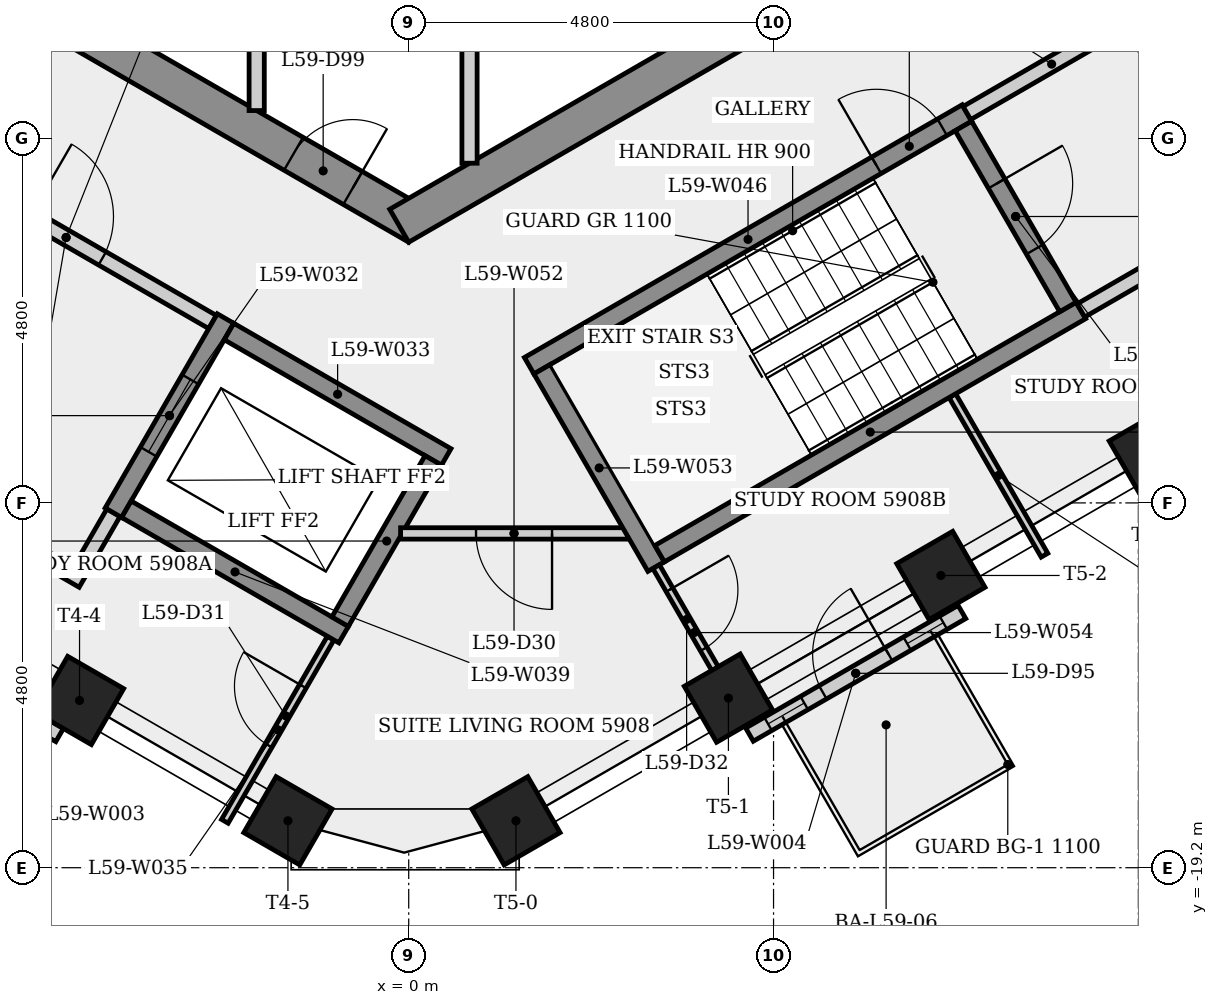
"""IFC4 building model, lengths in metres.
Left out: names, types, materials, properties, quantities, classifications, styles, units other than length and angle.
Written with IfcOpenShell. Run it as: python <this file> out.ifc"""

import sys

from ifc_helpers import new_model, si_unit, direction, frame, frame_2d, origin, origin_2d, place, context, subcontext, project, spatial, rectangle, extrude, element, fill, save


model = new_model("IFC4")
c1 = context("Model", 3, precision=1e-05, world=origin(), true_north=direction((0.0, 1.0)))
c2 = subcontext(c1, "Body", "Model", "MODEL_VIEW")
j1 = project(units=[si_unit("LENGTHUNIT", "METRE"), si_unit("PLANEANGLEUNIT", "RADIAN")], contexts=[c1])
p1 = place(None, origin())
s1 = spatial("IfcSite", under=j1, at=p1, CompositionType="ELEMENT")
p2 = place(p1, origin())
s2 = spatial("IfcBuilding", under=s1, at=p2, CompositionType="ELEMENT")
p3 = place(p2, frame((0.0, 0.0, 222.3)))
s3 = spatial("IfcBuildingStorey", under=s2, at=p3, CompositionType="ELEMENT", Elevation=222.3)
p4 = place(p3, frame((-9.375, -5.268, 0.0), z_axis=(0.0, 0.0, 1.0), x_axis=(0.866023993627, -0.500002442456, 0.0)))
e1 = element("IfcWall", 1, at=p4, inside=s3, PredefinedType="SHEAR", context=c2, shape_type="SweptSolid", body=[
    extrude(rectangle(XDim=10.97, YDim=0.5, at=frame_2d((5.485, 0.0))), origin(), (0.0, 0.0, 1.0), 3.4),
])
p5 = place(p4, frame((3.857, 0.0, 0.0)))
e2 = element("IfcOpeningElement", 2, at=p5, cuts=e1, PredefinedType="OPENING", context=c2, shape_type="SweptSolid", body=[
    extrude(rectangle(XDim=0.9, YDim=2.1, at=frame_2d((0.45, 1.05))), frame((0.0, 0.26, 0.0), z_axis=(0.0, -1.0, 0.0), x_axis=(1.0, 0.0, 0.0)), (0.0, 0.0, 1.0), 0.52),
])
p6 = place(p4, frame((9.076, 0.0, 0.0)))
e3 = element("IfcOpeningElement", 3, at=p6, cuts=e1, PredefinedType="OPENING", context=c2, shape_type="SweptSolid", body=[
    extrude(rectangle(XDim=0.9, YDim=2.1, at=frame_2d((0.45, 1.05))), frame((0.0, 0.26, 0.0), z_axis=(0.0, -1.0, 0.0), x_axis=(1.0, 0.0, 0.0)), (0.0, 0.0, 1.0), 0.52),
])
p7 = place(p3, frame((-0.125, -10.753, 0.0), z_axis=(0.0, 0.0, 1.0), x_axis=(0.866023993627, 0.500002442456, 0.0)))
e4 = element("IfcWall", 4, at=p7, inside=s3, PredefinedType="SHEAR", context=c2, shape_type="SweptSolid", body=[
    extrude(rectangle(XDim=10.97, YDim=0.5, at=frame_2d((5.485, 0.0))), origin(), (0.0, 0.0, 1.0), 3.4),
])
p8 = place(p7, frame((7.195, 0.0, 0.0)))
e5 = element("IfcOpeningElement", 5, at=p8, cuts=e4, PredefinedType="OPENING", context=c2, shape_type="SweptSolid", body=[
    extrude(rectangle(XDim=0.9, YDim=2.1, at=frame_2d((0.45, 1.05))), frame((0.0, 0.26, 0.0), z_axis=(0.0, -1.0, 0.0), x_axis=(1.0, 0.0, 0.0)), (0.0, 0.0, 1.0), 0.52),
])
for number, where, z_axis, x_axis in (
    (6, (-4.331, -17.0, 0.0), (0.0, 0.0, 1.0), (-0.5, -0.866, 0.0)),
    (7, (-1.589, -18.583, 0.0), (0.0, 0.0, 1.0), (-0.5, -0.866, 0.0)),
    (8, (1.411, -18.583, 0.0), (0.0, 0.0, 1.0), (0.5, -0.866, 0.0)),
    (9, (4.206, -16.969, 0.0), (0.0, 0.0, 1.0), (0.5, -0.866, 0.0)),
    (10, (7.001, -15.355, 0.0), (0.0, 0.0, 1.0), (0.5, -0.866, 0.0)),
    (11, (9.797, -13.741, 0.0), (0.0, 0.0, 1.0), (0.5, -0.866, 0.0)),
):
    element("IfcColumn", number, at=place(p3, frame(where, z_axis=z_axis, x_axis=x_axis)), inside=s3, PredefinedType="COLUMN", context=c2, shape_type="SweptSolid", body=[
        extrude(rectangle(XDim=0.85, YDim=0.85, at=origin_2d()), origin(), (0.0, 0.0, 1.0), 3.4),
    ])
p9 = place(p3, frame((-7.335, -15.871, 0.0), z_axis=(0.0, 0.0, 1.0), x_axis=(0.866032778651, -0.499987226139, 0.0)))
e12 = element("IfcWall", 12, at=p9, inside=s3, PredefinedType="SOLIDWALL", context=c2, shape_type="SweptSolid", body=[
    extrude(rectangle(XDim=3.166, YDim=0.2, at=frame_2d((1.583, 0.0))), origin(), (0.0, 0.0, 1.0), 3.4),
])
p10 = place(p9, frame((1.083, 0.0, 0.0)))
e13 = element("IfcOpeningElement", 13, at=p10, cuts=e12, PredefinedType="OPENING", context=c2, shape_type="SweptSolid", body=[
    extrude(rectangle(XDim=1.0, YDim=2.4, at=frame_2d((0.5, 1.2))), frame((0.0, 0.11, 0.0), z_axis=(0.0, -1.0, 0.0), x_axis=(1.0, 0.0, 0.0)), (0.0, 0.0, 1.0), 0.22),
])
p11 = place(p9, frame((0.267, 0.0, 0.9)))
e14 = element("IfcOpeningElement", 14, at=p11, cuts=e12, PredefinedType="OPENING", context=c2, shape_type="SweptSolid", body=[
    extrude(rectangle(XDim=0.55, YDim=1.5, at=frame_2d((0.275, 0.75))), frame((0.0, 0.11, 0.0), z_axis=(0.0, -1.0, 0.0), x_axis=(1.0, 0.0, 0.0)), (0.0, 0.0, 1.0), 0.22),
])
p12 = place(p9, frame((2.35, 0.0, 0.9)))
e15 = element("IfcOpeningElement", 15, at=p12, cuts=e12, PredefinedType="OPENING", context=c2, shape_type="SweptSolid", body=[
    extrude(rectangle(XDim=0.55, YDim=1.5, at=frame_2d((0.275, 0.75))), frame((0.0, 0.11, 0.0), z_axis=(0.0, -1.0, 0.0), x_axis=(1.0, 0.0, 0.0)), (0.0, 0.0, 1.0), 0.22),
])
p13 = place(p3, frame((4.484, -17.449, 0.0), z_axis=(0.0, 0.0, 1.0), x_axis=(0.866023062494, 0.500004055213, 0.0)))
e16 = element("IfcWall", 16, at=p13, inside=s3, PredefinedType="SOLIDWALL", context=c2, shape_type="SweptSolid", body=[
    extrude(rectangle(XDim=3.227, YDim=0.2, at=frame_2d((1.614, 0.0))), origin(), (0.0, 0.0, 1.0), 3.4),
])
p14 = place(p13, frame((1.114, 0.0, 0.0)))
e17 = element("IfcOpeningElement", 17, at=p14, cuts=e16, PredefinedType="OPENING", context=c2, shape_type="SweptSolid", body=[
    extrude(rectangle(XDim=1.0, YDim=2.4, at=frame_2d((0.5, 1.2))), frame((0.0, 0.11, 0.0), z_axis=(0.0, -1.0, 0.0), x_axis=(1.0, 0.0, 0.0)), (0.0, 0.0, 1.0), 0.22),
])
p15 = place(p13, frame((0.282, 0.0, 0.9)))
e18 = element("IfcOpeningElement", 18, at=p15, cuts=e16, PredefinedType="OPENING", context=c2, shape_type="SweptSolid", body=[
    extrude(rectangle(XDim=0.55, YDim=1.5, at=frame_2d((0.275, 0.75))), frame((0.0, 0.11, 0.0), z_axis=(0.0, -1.0, 0.0), x_axis=(1.0, 0.0, 0.0)), (0.0, 0.0, 1.0), 0.22),
])
p16 = place(p13, frame((2.395, 0.0, 0.9)))
e19 = element("IfcOpeningElement", 19, at=p16, cuts=e16, PredefinedType="OPENING", context=c2, shape_type="SweptSolid", body=[
    extrude(rectangle(XDim=0.55, YDim=1.5, at=frame_2d((0.275, 0.75))), frame((0.0, 0.11, 0.0), z_axis=(0.0, -1.0, 0.0), x_axis=(1.0, 0.0, 0.0)), (0.0, 0.0, 1.0), 0.22),
])
p17 = place(p3, frame((-6.435, -9.795, 0.0), z_axis=(0.0, 0.0, 1.0), x_axis=(0.866012907634, -0.500021643343, 0.0)))
e20 = element("IfcWall", 20, at=p17, inside=s3, PredefinedType="PARTITIONING", context=c2, shape_type="SweptSolid", body=[
    extrude(rectangle(XDim=4.45, YDim=0.2, at=frame_2d((2.225, 0.0))), origin(), (0.0, 0.0, 1.0), 3.05),
])
p18 = place(p17, frame((1.675, 0.0, 0.0)))
e21 = element("IfcOpeningElement", 21, at=p18, cuts=e20, PredefinedType="OPENING", context=c2, shape_type="SweptSolid", body=[
    extrude(rectangle(XDim=1.1, YDim=2.1, at=frame_2d((0.55, 1.05))), frame((0.0, 0.11, 0.0), z_axis=(0.0, -1.0, 0.0), x_axis=(1.0, 0.0, 0.0)), (0.0, 0.0, 1.0), 0.22),
])
p19 = place(p3, frame((-4.286, -15.423, 0.0), z_axis=(0.0, 0.0, 1.0), x_axis=(-0.866026010844, 0.49999894854, 0.0)))
e22 = element("IfcWall", 22, at=p19, inside=s3, PredefinedType="PARTITIONING", context=c2, shape_type="SweptSolid", body=[
    extrude(rectangle(XDim=4.0, YDim=0.2, at=frame_2d((2.0, 0.0))), origin(), (0.0, 0.0, 1.0), 3.05),
])
p20 = place(p3, frame((-3.885, -14.529, 0.0), z_axis=(0.0, 0.0, 1.0), x_axis=(-0.499859285417, -0.866106630146, 0.0)))
e23 = element("IfcWall", 23, at=p20, inside=s3, PredefinedType="PARTITIONING", context=c2, shape_type="SweptSolid", body=[
    extrude(rectangle(XDim=0.875, YDim=0.2, at=frame_2d((0.438, 0.0))), origin(), (0.0, 0.0, 1.0), 3.05),
])
p21 = place(p3, frame((-2.41, -11.974, 0.0), z_axis=(0.0, 0.0, 1.0), x_axis=(-0.500001826776, -0.866024349092, 0.0)))
e24 = element("IfcWall", 24, at=p21, inside=s3, PredefinedType="SHEAR", context=c2, shape_type="SweptSolid", body=[
    extrude(rectangle(XDim=2.95, YDim=0.25, at=frame_2d((1.475, 0.0))), origin(), (0.0, 0.0, 1.0), 3.05),
])
p22 = place(p21, frame((0.925, 0.0, 0.0)))
e25 = element("IfcOpeningElement", 25, at=p22, cuts=e24, PredefinedType="OPENING", context=c2, shape_type="SweptSolid", body=[
    extrude(rectangle(XDim=1.1, YDim=2.1, at=frame_2d((0.55, 1.05))), frame((0.0, 0.135, 0.0), z_axis=(0.0, -1.0, 0.0), x_axis=(1.0, 0.0, 0.0)), (0.0, 0.0, 1.0), 0.27),
])
p23 = place(p3, frame((-2.364, -12.145, 0.0), z_axis=(0.0, 0.0, 1.0), x_axis=(0.866040211805, -0.499974350878, 0.0)))
e26 = element("IfcWall", 26, at=p23, inside=s3, PredefinedType="SHEAR", context=c2, shape_type="SweptSolid", body=[
    extrude(rectangle(XDim=3.3, YDim=0.25, at=frame_2d((1.65, 0.0))), origin(), (0.0, 0.0, 1.0), 3.05),
])
p24 = place(p3, frame((-2.419, -18.59, 0.0), z_axis=(0.0, 0.0, 1.0), x_axis=(0.500016013541, 0.866016158165, 0.0)))
e27 = element("IfcWall", 27, at=p24, inside=s3, PredefinedType="PARTITIONING", context=c2, shape_type="SweptSolid", body=[
    extrude(rectangle(XDim=2.784, YDim=0.1, at=frame_2d((1.392, 0.0))), origin(), (0.0, 0.0, 1.0), 3.05),
])
p25 = place(p24, frame((1.152, 0.0, 0.0)))
e28 = element("IfcOpeningElement", 28, at=p25, cuts=e27, PredefinedType="OPENING", context=c2, shape_type="SweptSolid", body=[
    extrude(rectangle(XDim=0.9, YDim=2.1, at=frame_2d((0.45, 1.05))), frame((0.0, 0.06, 0.0), z_axis=(0.0, -1.0, 0.0), x_axis=(1.0, 0.0, 0.0)), (0.0, 0.0, 1.0), 0.12),
])
p26 = place(p3, frame((-2.0, -5.25, 0.0), z_axis=(0.0, 0.0, 1.0), x_axis=(0.0, -1.0, 0.0)))
e29 = element("IfcWall", 29, at=p26, inside=s3, PredefinedType="PARTITIONING", context=c2, shape_type="SweptSolid", body=[
    extrude(rectangle(XDim=3.988, YDim=0.2, at=frame_2d((1.994, 0.0))), origin(), (0.0, 0.0, 1.0), 3.05),
])
p27 = place(p3, frame((-0.856, -16.133, 0.0), z_axis=(0.0, 0.0, 1.0), x_axis=(-0.866021716278, 0.500006386895, 0.0)))
e30 = element("IfcWall", 30, at=p27, inside=s3, PredefinedType="SHEAR", context=c2, shape_type="SweptSolid", body=[
    extrude(rectangle(XDim=3.3, YDim=0.25, at=frame_2d((1.65, 0.0))), origin(), (0.0, 0.0, 1.0), 3.05),
])
p28 = place(p3, frame((-0.902, -15.962, 0.0), z_axis=(0.0, 0.0, 1.0), x_axis=(0.500061746146, 0.865989751695, 0.0)))
e31 = element("IfcWall", 31, at=p28, inside=s3, PredefinedType="SHEAR", context=c2, shape_type="SweptSolid", body=[
    extrude(rectangle(XDim=2.45, YDim=0.25, at=frame_2d((1.225, 0.0))), origin(), (0.0, 0.0, 1.0), 3.4),
])
p29 = place(p3, frame((0.8, -5.25, 0.0), z_axis=(0.0, 0.0, 1.0), x_axis=(0.0, -1.0, 0.0)))
e32 = element("IfcWall", 32, at=p29, inside=s3, PredefinedType="PARTITIONING", context=c2, shape_type="SweptSolid", body=[
    extrude(rectangle(XDim=4.68, YDim=0.2, at=frame_2d((2.34, 0.0))), origin(), (0.0, 0.0, 1.0), 3.05),
])
p30 = place(p3, frame((1.585, -12.595, 0.0), z_axis=(0.0, 0.0, 1.0), x_axis=(0.866036417653, 0.499980922934, 0.0)))
e33 = element("IfcWall", 33, at=p30, inside=s3, PredefinedType="SHEAR", context=c2, shape_type="SweptSolid", body=[
    extrude(rectangle(XDim=6.65, YDim=0.25, at=frame_2d((3.325, 0.0))), origin(), (0.0, 0.0, 1.0), 3.05),
])
p31 = place(p30, frame((5.275, 0.0, 0.0)))
e34 = element("IfcOpeningElement", 34, at=p31, cuts=e33, PredefinedType="OPENING", context=c2, shape_type="SweptSolid", body=[
    extrude(rectangle(XDim=1.0, YDim=2.1, at=frame_2d((0.5, 1.05))), frame((0.0, 0.135, 0.0), z_axis=(0.0, -1.0, 0.0), x_axis=(1.0, 0.0, 0.0)), (0.0, 0.0, 1.0), 0.27),
])
p32 = place(p3, frame((2.878, -14.802, 0.0), z_axis=(0.0, 0.0, 1.0), x_axis=(-1.0, 0.0, 0.0)))
e35 = element("IfcWall", 35, at=p32, inside=s3, PredefinedType="PARTITIONING", context=c2, shape_type="SweptSolid", body=[
    extrude(rectangle(XDim=2.985, YDim=0.15, at=frame_2d((1.493, 0.0))), origin(), (0.0, 0.0, 1.0), 3.05),
])
p33 = place(p32, frame((0.992, 0.0, 0.0)))
e36 = element("IfcOpeningElement", 36, at=p33, cuts=e35, PredefinedType="OPENING", context=c2, shape_type="SweptSolid", body=[
    extrude(rectangle(XDim=1.0, YDim=2.1, at=frame_2d((0.5, 1.05))), frame((0.0, 0.085, 0.0), z_axis=(0.0, -1.0, 0.0), x_axis=(1.0, 0.0, 0.0)), (0.0, 0.0, 1.0), 0.17),
])
p34 = place(p3, frame((1.756, -12.641, 0.0), z_axis=(0.0, 0.0, 1.0), x_axis=(0.50002537861, -0.866010750942, 0.0)))
e37 = element("IfcWall", 37, at=p34, inside=s3, PredefinedType="SHEAR", context=c2, shape_type="SweptSolid", body=[
    extrude(rectangle(XDim=3.0, YDim=0.25, at=frame_2d((1.5, 0.0))), origin(), (0.0, 0.0, 1.0), 3.05),
])
p35 = place(p3, frame((3.256, -15.239, 0.0), z_axis=(0.0, 0.0, 1.0), x_axis=(0.499940491075, -0.866059758552, 0.0)))
e38 = element("IfcWall", 38, at=p35, inside=s3, PredefinedType="PARTITIONING", context=c2, shape_type="SweptSolid", body=[
    extrude(rectangle(XDim=2.003, YDim=0.1, at=frame_2d((1.001, 0.0))), origin(), (0.0, 0.0, 1.0), 3.05),
])
p36 = place(p35, frame((0.352, 0.0, 0.0)))
e39 = element("IfcOpeningElement", 39, at=p36, cuts=e38, PredefinedType="OPENING", context=c2, shape_type="SweptSolid", body=[
    extrude(rectangle(XDim=0.9, YDim=2.1, at=frame_2d((0.45, 1.05))), frame((0.0, 0.06, 0.0), z_axis=(0.0, -1.0, 0.0), x_axis=(1.0, 0.0, 0.0)), (0.0, 0.0, 1.0), 0.12),
])
p37 = place(p3, frame((7.153, -12.989, 0.0), z_axis=(0.0, 0.0, 1.0), x_axis=(0.500027571904, -0.866009484553, 0.0)))
e40 = element("IfcWall", 40, at=p37, inside=s3, PredefinedType="PARTITIONING", context=c2, shape_type="SweptSolid", body=[
    extrude(rectangle(XDim=2.424, YDim=0.1, at=frame_2d((1.212, 0.0))), origin(), (0.0, 0.0, 1.0), 3.05),
])
p38 = place(p3, frame((3.301, -15.068, 0.0), z_axis=(0.0, 0.0, 1.0), x_axis=(0.866035036182, 0.499983315828, 0.0)))
e41 = element("IfcWall", 41, at=p38, inside=s3, PredefinedType="SHEAR", context=c2, shape_type="SweptSolid", body=[
    extrude(rectangle(XDim=6.4, YDim=0.25, at=frame_2d((3.2, 0.0))), origin(), (0.0, 0.0, 1.0), 3.05),
])
p39 = place(p3, frame((7.298, -9.441, 0.0), z_axis=(0.0, 0.0, 1.0), x_axis=(0.500034990121, -0.866005201286, 0.0)))
e42 = element("IfcWall", 42, at=p39, inside=s3, PredefinedType="SHEAR", context=c2, shape_type="SweptSolid", body=[
    extrude(rectangle(XDim=2.75, YDim=0.25, at=frame_2d((1.375, 0.0))), origin(), (0.0, 0.0, 1.0), 3.05),
])
p40 = place(p39, frame((0.875, 0.0, 0.0)))
e43 = element("IfcOpeningElement", 43, at=p40, cuts=e42, PredefinedType="OPENING", context=c2, shape_type="SweptSolid", body=[
    extrude(rectangle(XDim=1.0, YDim=2.1, at=frame_2d((0.5, 1.05))), frame((0.0, 0.135, 0.0), z_axis=(0.0, -1.0, 0.0), x_axis=(1.0, 0.0, 0.0)), (0.0, 0.0, 1.0), 0.27),
])
p41 = place(p3, frame((7.344, -9.27, 0.0), z_axis=(0.0, 0.0, 1.0), x_axis=(0.866005588531, 0.500034319456, 0.0)))
e44 = element("IfcWall", 44, at=p41, inside=s3, PredefinedType="PARTITIONING", context=c2, shape_type="SweptSolid", body=[
    extrude(rectangle(XDim=2.575, YDim=0.2, at=frame_2d((1.288, 0.0))), origin(), (0.0, 0.0, 1.0), 3.05),
])
p42 = place(p3, frame((9.537, -8.119, 0.0), z_axis=(0.0, 0.0, 1.0), x_axis=(0.500021781351, -0.86601282795, 0.0)))
e45 = element("IfcWall", 45, at=p42, inside=s3, PredefinedType="PARTITIONING", context=c2, shape_type="SweptSolid", body=[
    extrude(rectangle(XDim=2.942, YDim=0.2, at=frame_2d((1.471, 0.0))), origin(), (0.0, 0.0, 1.0), 3.05),
])
p43 = place(p42, frame((0.916, 0.0, 0.0)))
e46 = element("IfcOpeningElement", 46, at=p43, cuts=e45, PredefinedType="OPENING", context=c2, shape_type="SweptSolid", body=[
    extrude(rectangle(XDim=1.0, YDim=2.1, at=frame_2d((0.5, 1.05))), frame((0.0, 0.11, 0.0), z_axis=(0.0, -1.0, 0.0), x_axis=(1.0, 0.0, 0.0)), (0.0, 0.0, 1.0), 0.22),
])
p44 = place(p3, frame((11.031, -10.606, 0.0), z_axis=(0.0, 0.0, 1.0), x_axis=(-0.866014894461, -0.50001820224, 0.0)))
e47 = element("IfcWall", 47, at=p44, inside=s3, PredefinedType="PARTITIONING", context=c2, shape_type="SweptSolid", body=[
    extrude(rectangle(XDim=2.525, YDim=0.2, at=frame_2d((1.262, 0.0))), origin(), (0.0, 0.0, 1.0), 3.05),
])
p45 = place(p14, origin())
e48 = element("IfcDoor", 48, at=p45, inside=s3, OperationType="SINGLE_SWING_RIGHT", PredefinedType="DOOR", context=c2, shape_type="SweptSolid", body=[
    extrude(rectangle(XDim=1.0, YDim=2.4, at=frame_2d((0.5, 1.2))), frame((0.0, 0.025, 0.0), z_axis=(0.0, -1.0, 0.0), x_axis=(1.0, 0.0, 0.0)), (0.0, 0.0, 1.0), 0.05),
])
fill(e17, e48)
p46 = place(p15, origin())
e49 = element("IfcWindow", 49, at=p46, inside=s3, PartitioningType="SINGLE_PANEL", PredefinedType="WINDOW", context=c2, shape_type="SweptSolid", body=[
    extrude(rectangle(XDim=0.55, YDim=1.5, at=frame_2d((0.275, 0.75))), frame((0.0, 0.03, 0.0), z_axis=(0.0, -1.0, 0.0), x_axis=(1.0, 0.0, 0.0)), (0.0, 0.0, 1.0), 0.06),
])
fill(e18, e49)
p47 = place(p16, origin())
e50 = element("IfcWindow", 50, at=p47, inside=s3, PartitioningType="SINGLE_PANEL", PredefinedType="WINDOW", context=c2, shape_type="SweptSolid", body=[
    extrude(rectangle(XDim=0.55, YDim=1.5, at=frame_2d((0.275, 0.75))), frame((0.0, 0.03, 0.0), z_axis=(0.0, -1.0, 0.0), x_axis=(1.0, 0.0, 0.0)), (0.0, 0.0, 1.0), 0.06),
])
fill(e19, e50)
p48 = place(p18, origin())
e51 = element("IfcDoor", 51, at=p48, inside=s3, OperationType="SINGLE_SWING_LEFT", PredefinedType="DOOR", context=c2, shape_type="SweptSolid", body=[
    extrude(rectangle(XDim=1.1, YDim=2.1, at=frame_2d((0.55, 1.05))), frame((0.0, 0.025, 0.0), z_axis=(0.0, -1.0, 0.0), x_axis=(1.0, 0.0, 0.0)), (0.0, 0.0, 1.0), 0.05),
])
fill(e21, e51)
p49 = place(p22, origin())
e52 = element("IfcDoor", 52, at=p49, inside=s3, OperationType="SLIDING_TO_LEFT", PredefinedType="DOOR", context=c2, shape_type="SweptSolid", body=[
    extrude(rectangle(XDim=1.1, YDim=2.1, at=frame_2d((0.55, 1.05))), frame((0.0, 0.025, 0.0), z_axis=(0.0, -1.0, 0.0), x_axis=(1.0, 0.0, 0.0)), (0.0, 0.0, 1.0), 0.05),
])
fill(e25, e52)
p50 = place(p31, origin())
e53 = element("IfcDoor", 53, at=p50, inside=s3, OperationType="SINGLE_SWING_LEFT", PredefinedType="DOOR", context=c2, shape_type="SweptSolid", body=[
    extrude(rectangle(XDim=1.0, YDim=2.1, at=frame_2d((0.5, 1.05))), frame((0.0, 0.025, 0.0), z_axis=(0.0, -1.0, 0.0), x_axis=(1.0, 0.0, 0.0)), (0.0, 0.0, 1.0), 0.05),
])
fill(e34, e53)
p51 = place(p40, origin())
e54 = element("IfcDoor", 54, at=p51, inside=s3, OperationType="SINGLE_SWING_LEFT", PredefinedType="DOOR", context=c2, shape_type="SweptSolid", body=[
    extrude(rectangle(XDim=1.0, YDim=2.1, at=frame_2d((0.5, 1.05))), frame((0.0, 0.025, 0.0), z_axis=(0.0, -1.0, 0.0), x_axis=(1.0, 0.0, 0.0)), (0.0, 0.0, 1.0), 0.05),
])
fill(e43, e54)
p52 = place(p33, origin())
e55 = element("IfcDoor", 55, at=p52, inside=s3, OperationType="SINGLE_SWING_LEFT", PredefinedType="DOOR", context=c2, shape_type="SweptSolid", body=[
    extrude(rectangle(XDim=1.0, YDim=2.1, at=frame_2d((0.5, 1.05))), frame((0.0, 0.025, 0.0), z_axis=(0.0, -1.0, 0.0), x_axis=(1.0, 0.0, 0.0)), (0.0, 0.0, 1.0), 0.05),
])
fill(e36, e55)
p53 = place(p25, origin())
e56 = element("IfcDoor", 56, at=p53, inside=s3, OperationType="SINGLE_SWING_RIGHT", PredefinedType="DOOR", context=c2, shape_type="SweptSolid", body=[
    extrude(rectangle(XDim=0.9, YDim=2.1, at=frame_2d((0.45, 1.05))), frame((0.0, 0.025, 0.0), z_axis=(0.0, -1.0, 0.0), x_axis=(1.0, 0.0, 0.0)), (0.0, 0.0, 1.0), 0.05),
])
fill(e28, e56)
p54 = place(p36, origin())
e57 = element("IfcDoor", 57, at=p54, inside=s3, OperationType="SINGLE_SWING_LEFT", PredefinedType="DOOR", context=c2, shape_type="SweptSolid", body=[
    extrude(rectangle(XDim=0.9, YDim=2.1, at=frame_2d((0.45, 1.05))), frame((0.0, 0.025, 0.0), z_axis=(0.0, -1.0, 0.0), x_axis=(1.0, 0.0, 0.0)), (0.0, 0.0, 1.0), 0.05),
])
fill(e39, e57)
p55 = place(p6, origin())
e58 = element("IfcDoor", 58, at=p55, inside=s3, OperationType="SINGLE_SWING_RIGHT", PredefinedType="DOOR", context=c2, shape_type="SweptSolid", body=[
    extrude(rectangle(XDim=0.9, YDim=2.1, at=frame_2d((0.45, 1.05))), frame((0.0, 0.025, 0.0), z_axis=(0.0, -1.0, 0.0), x_axis=(1.0, 0.0, 0.0)), (0.0, 0.0, 1.0), 0.05),
])
fill(e3, e58)
save(model, sys.argv[1])
